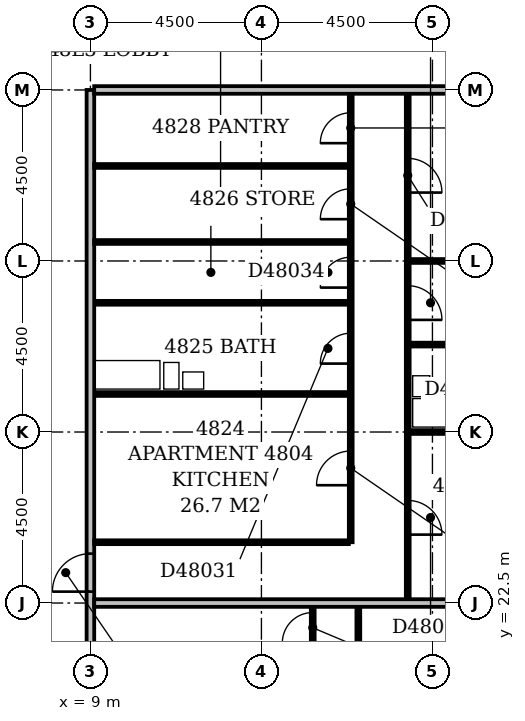
"""IFC4 building model, lengths in metres.
Left out: names, types, materials, properties, quantities, classifications, styles, units other than length and angle.
Written with IfcOpenShell. Run it as: python <this file> out.ifc"""

import sys

from ifc_helpers import new_model, si_unit, direction, frame, frame_2d, origin, place, context, subcontext, project, spatial, rectangle, extrude, element, fill, save


model = new_model("IFC4")
c1 = context("Model", 3, precision=1e-05, world=origin(), true_north=direction((0.0, 1.0)))
c2 = subcontext(c1, "Body", "Model", "MODEL_VIEW")
j1 = project(units=[si_unit("LENGTHUNIT", "METRE"), si_unit("PLANEANGLEUNIT", "RADIAN")], contexts=[c1])
p1 = place(None, origin())
s1 = spatial("IfcSite", under=j1, at=p1, CompositionType="ELEMENT")
p2 = place(p1, origin())
s2 = spatial("IfcBuilding", under=s1, at=p2, CompositionType="ELEMENT")
p3 = place(p2, frame((0.0, 0.0, 189.8)))
s3 = spatial("IfcBuildingStorey", under=s2, at=p3, CompositionType="ELEMENT", Elevation=189.8)
p4 = place(p3, frame((9.0, 5.0, 0.0), z_axis=(0.0, 0.0, 1.0), x_axis=(0.0, 1.0, 0.0)))
e1 = element("IfcWall", 1, at=p4, inside=s3, PredefinedType="PARTITIONING", context=c2, shape_type="SweptSolid", body=[
    extrude(rectangle(XDim=31.0, YDim=0.2, at=frame_2d((15.5, 0.0))), origin(), (0.0, 0.0, 1.0), 3.3),
])
p5 = place(p4, frame((17.8, 0.0, 0.0)))
e2 = element("IfcOpeningElement", 2, at=p5, cuts=e1, PredefinedType="OPENING", context=c2, shape_type="SweptSolid", body=[
    extrude(rectangle(XDim=1.0, YDim=2.1, at=frame_2d((0.5, 1.05))), frame((0.0, 0.112, 0.0), z_axis=(0.0, -1.0, 0.0), x_axis=(1.0, 0.0, 0.0)), (0.0, 0.0, 1.0), 0.224),
])
p6 = place(p4, frame((14.95, 0.0, 0.0)))
e3 = element("IfcOpeningElement", 3, at=p6, cuts=e1, PredefinedType="OPENING", context=c2, shape_type="SweptSolid", body=[
    extrude(rectangle(XDim=1.0, YDim=2.1, at=frame_2d((0.5, 1.05))), frame((0.0, 0.112, 0.0), z_axis=(0.0, -1.0, 0.0), x_axis=(1.0, 0.0, 0.0)), (0.0, 0.0, 1.0), 0.224),
])
p7 = place(p4, frame((9.3, 0.0, 0.0)))
e4 = element("IfcOpeningElement", 4, at=p7, cuts=e1, PredefinedType="OPENING", context=c2, shape_type="SweptSolid", body=[
    extrude(rectangle(XDim=1.0, YDim=2.1, at=frame_2d((0.5, 1.05))), frame((0.0, 0.112, 0.0), z_axis=(0.0, -1.0, 0.0), x_axis=(1.0, 0.0, 0.0)), (0.0, 0.0, 1.0), 0.224),
])
p8 = place(p4, frame((1.5, 0.0, 0.0)))
e5 = element("IfcOpeningElement", 5, at=p8, cuts=e1, PredefinedType="OPENING", context=c2, shape_type="SweptSolid", body=[
    extrude(rectangle(XDim=0.9, YDim=2.1, at=frame_2d((0.45, 1.05))), frame((0.0, 0.112, 0.0), z_axis=(0.0, -1.0, 0.0), x_axis=(1.0, 0.0, 0.0)), (0.0, 0.0, 1.0), 0.224),
])
p9 = place(p3, frame((16.05, 18.1, 0.0), z_axis=(0.0, 0.0, 1.0), x_axis=(0.0, 1.0, 0.0)))
e6 = element("IfcWall", 6, at=p9, inside=s3, PredefinedType="PARTITIONING", context=c2, shape_type="SweptSolid", body=[
    extrude(rectangle(XDim=4.3, YDim=0.1, at=frame_2d((2.15, 0.0))), origin(), (0.0, 0.0, 1.0), 3.3),
])
p10 = place(p9, frame((1.7, 0.0, 0.0)))
e7 = element("IfcOpeningElement", 7, at=p10, cuts=e6, PredefinedType="OPENING", context=c2, shape_type="SweptSolid", body=[
    extrude(rectangle(XDim=0.9, YDim=2.1, at=frame_2d((0.45, 1.05))), frame((0.0, 0.062, 0.0), z_axis=(0.0, -1.0, 0.0), x_axis=(1.0, 0.0, 0.0)), (0.0, 0.0, 1.0), 0.124),
])
p11 = place(p3, frame((14.85, 21.2, 0.0), z_axis=(0.0, 0.0, 1.0), x_axis=(0.0, 1.0, 0.0)))
e8 = element("IfcWall", 8, at=p11, inside=s3, PredefinedType="PARTITIONING", context=c2, shape_type="SweptSolid", body=[
    extrude(rectangle(XDim=1.2, YDim=0.1, at=frame_2d((0.6, 0.0))), origin(), (0.0, 0.0, 1.0), 3.3),
])
p12 = place(p11, frame((0.25, 0.0, 0.0)))
e9 = element("IfcOpeningElement", 9, at=p12, cuts=e8, PredefinedType="OPENING", context=c2, shape_type="SweptSolid", body=[
    extrude(rectangle(XDim=0.8, YDim=2.1, at=frame_2d((0.4, 1.05))), frame((0.0, 0.062, 0.0), z_axis=(0.0, -1.0, 0.0), x_axis=(1.0, 0.0, 0.0)), (0.0, 0.0, 1.0), 0.124),
])
p13 = place(p3, frame((9.1, 22.5, 0.0), z_axis=(0.0, 0.0, 1.0), x_axis=(1.0, 0.0, 0.0)))
e10 = element("IfcWall", 10, at=p13, inside=s3, PredefinedType="PARTITIONING", context=c2, shape_type="SweptSolid", body=[
    extrude(rectangle(XDim=12.95, YDim=0.2, at=frame_2d((6.475, 0.0))), origin(), (0.0, 0.0, 1.0), 3.3),
])
p14 = place(p3, frame((17.35, 22.6, 0.0), z_axis=(0.0, 0.0, 1.0), x_axis=(0.0, 1.0, 0.0)))
e11 = element("IfcWall", 11, at=p14, inside=s3, PredefinedType="PARTITIONING", context=c2, shape_type="SweptSolid", body=[
    extrude(rectangle(XDim=13.3, YDim=0.1, at=frame_2d((6.65, 0.0))), origin(), (0.0, 0.0, 1.0), 3.3),
])
p15 = place(p14, frame((1.7, 0.0, 0.0)))
e12 = element("IfcOpeningElement", 12, at=p15, cuts=e11, PredefinedType="OPENING", context=c2, shape_type="SweptSolid", body=[
    extrude(rectangle(XDim=0.9, YDim=2.1, at=frame_2d((0.45, 1.05))), frame((0.0, 0.062, 0.0), z_axis=(0.0, -1.0, 0.0), x_axis=(1.0, 0.0, 0.0)), (0.0, 0.0, 1.0), 0.124),
])
p16 = place(p14, frame((7.35, 0.0, 0.0)))
e13 = element("IfcOpeningElement", 13, at=p16, cuts=e11, PredefinedType="OPENING", context=c2, shape_type="SweptSolid", body=[
    extrude(rectangle(XDim=0.9, YDim=2.1, at=frame_2d((0.45, 1.05))), frame((0.0, 0.062, 0.0), z_axis=(0.0, -1.0, 0.0), x_axis=(1.0, 0.0, 0.0)), (0.0, 0.0, 1.0), 0.124),
])
p17 = place(p14, frame((10.7, 0.0, 0.0)))
e14 = element("IfcOpeningElement", 14, at=p17, cuts=e11, PredefinedType="OPENING", context=c2, shape_type="SweptSolid", body=[
    extrude(rectangle(XDim=0.9, YDim=2.1, at=frame_2d((0.45, 1.05))), frame((0.0, 0.062, 0.0), z_axis=(0.0, -1.0, 0.0), x_axis=(1.0, 0.0, 0.0)), (0.0, 0.0, 1.0), 0.124),
])
p18 = place(p3, frame((9.1, 24.1, 0.0), z_axis=(0.0, 0.0, 1.0), x_axis=(1.0, 0.0, 0.0)))
e15 = element("IfcWall", 15, at=p18, inside=s3, PredefinedType="PARTITIONING", context=c2, shape_type="SweptSolid", body=[
    extrude(rectangle(XDim=6.7, YDim=0.1, at=frame_2d((3.35, 0.0))), origin(), (0.0, 0.0, 1.0), 3.3),
])
p19 = place(p3, frame((15.85, 24.1, 0.0), z_axis=(0.0, 0.0, 1.0), x_axis=(0.0, 1.0, 0.0)))
e16 = element("IfcWall", 16, at=p19, inside=s3, PredefinedType="PARTITIONING", context=c2, shape_type="SweptSolid", body=[
    extrude(rectangle(XDim=11.8, YDim=0.1, at=frame_2d((5.9, 0.0))), origin(), (0.0, 0.0, 1.0), 3.3),
])
p20 = place(p19, frame((4.7, 0.0, 0.0)))
e17 = element("IfcOpeningElement", 17, at=p20, cuts=e16, PredefinedType="OPENING", context=c2, shape_type="SweptSolid", body=[
    extrude(rectangle(XDim=0.8, YDim=2.1, at=frame_2d((0.4, 1.05))), frame((0.0, 0.062, 0.0), z_axis=(0.0, -1.0, 0.0), x_axis=(1.0, 0.0, 0.0)), (0.0, 0.0, 1.0), 0.124),
])
p21 = place(p19, frame((1.5, 0.0, 0.0)))
e18 = element("IfcOpeningElement", 18, at=p21, cuts=e16, PredefinedType="OPENING", context=c2, shape_type="SweptSolid", body=[
    extrude(rectangle(XDim=0.9, YDim=2.1, at=frame_2d((0.45, 1.05))), frame((0.0, 0.062, 0.0), z_axis=(0.0, -1.0, 0.0), x_axis=(1.0, 0.0, 0.0)), (0.0, 0.0, 1.0), 0.124),
])
p22 = place(p19, frame((10.5, 0.0, 0.0)))
e19 = element("IfcOpeningElement", 19, at=p22, cuts=e16, PredefinedType="OPENING", context=c2, shape_type="SweptSolid", body=[
    extrude(rectangle(XDim=0.8, YDim=2.1, at=frame_2d((0.4, 1.05))), frame((0.0, 0.062, 0.0), z_axis=(0.0, -1.0, 0.0), x_axis=(1.0, 0.0, 0.0)), (0.0, 0.0, 1.0), 0.124),
])
p23 = place(p19, frame((6.7, 0.0, 0.0)))
e20 = element("IfcOpeningElement", 20, at=p23, cuts=e16, PredefinedType="OPENING", context=c2, shape_type="SweptSolid", body=[
    extrude(rectangle(XDim=0.8, YDim=2.1, at=frame_2d((0.4, 1.05))), frame((0.0, 0.062, 0.0), z_axis=(0.0, -1.0, 0.0), x_axis=(1.0, 0.0, 0.0)), (0.0, 0.0, 1.0), 0.124),
])
p24 = place(p19, frame((8.5, 0.0, 0.0)))
e21 = element("IfcOpeningElement", 21, at=p24, cuts=e16, PredefinedType="OPENING", context=c2, shape_type="SweptSolid", body=[
    extrude(rectangle(XDim=0.8, YDim=2.1, at=frame_2d((0.4, 1.05))), frame((0.0, 0.062, 0.0), z_axis=(0.0, -1.0, 0.0), x_axis=(1.0, 0.0, 0.0)), (0.0, 0.0, 1.0), 0.124),
])
p25 = place(p3, frame((17.4, 27.0, 0.0), z_axis=(0.0, 0.0, 1.0), x_axis=(1.0, 0.0, 0.0)))
e22 = element("IfcWall", 22, at=p25, inside=s3, PredefinedType="PARTITIONING", context=c2, shape_type="SweptSolid", body=[
    extrude(rectangle(XDim=4.65, YDim=0.1, at=frame_2d((2.325, 0.0))), origin(), (0.0, 0.0, 1.0), 2.7),
])
p26 = place(p3, frame((9.1, 28.0, 0.0), z_axis=(0.0, 0.0, 1.0), x_axis=(1.0, 0.0, 0.0)))
e23 = element("IfcWall", 23, at=p26, inside=s3, PredefinedType="PLUMBINGWALL", context=c2, shape_type="SweptSolid", body=[
    extrude(rectangle(XDim=6.7, YDim=0.1, at=frame_2d((3.35, 0.0))), origin(), (0.0, 0.0, 1.0), 3.3),
])
p27 = place(p3, frame((17.4, 29.3, 0.0), z_axis=(0.0, 0.0, 1.0), x_axis=(1.0, 0.0, 0.0)))
e24 = element("IfcWall", 24, at=p27, inside=s3, PredefinedType="PLUMBINGWALL", context=c2, shape_type="SweptSolid", body=[
    extrude(rectangle(XDim=2.8, YDim=0.1, at=frame_2d((1.4, 0.0))), origin(), (0.0, 0.0, 1.0), 3.3),
])
p28 = place(p27, frame((1.0, 0.0, 0.0)))
e25 = element("IfcOpeningElement", 25, at=p28, cuts=e24, PredefinedType="OPENING", context=c2, shape_type="SweptSolid", body=[
    extrude(rectangle(XDim=0.8, YDim=2.1, at=frame_2d((0.4, 1.05))), frame((0.0, 0.062, 0.0), z_axis=(0.0, -1.0, 0.0), x_axis=(1.0, 0.0, 0.0)), (0.0, 0.0, 1.0), 0.124),
])
p29 = place(p3, frame((9.1, 30.4, 0.0), z_axis=(0.0, 0.0, 1.0), x_axis=(1.0, 0.0, 0.0)))
e26 = element("IfcWall", 26, at=p29, inside=s3, PredefinedType="PLUMBINGWALL", context=c2, shape_type="SweptSolid", body=[
    extrude(rectangle(XDim=6.7, YDim=0.1, at=frame_2d((3.35, 0.0))), origin(), (0.0, 0.0, 1.0), 3.3),
])
p30 = place(p3, frame((17.4, 31.5, 0.0), z_axis=(0.0, 0.0, 1.0), x_axis=(1.0, 0.0, 0.0)))
e27 = element("IfcWall", 27, at=p30, inside=s3, PredefinedType="PARTITIONING", context=c2, shape_type="SweptSolid", body=[
    extrude(rectangle(XDim=4.65, YDim=0.1, at=frame_2d((2.325, 0.0))), origin(), (0.0, 0.0, 1.0), 3.3),
])
for number, where, z_axis, x_axis in (
    (28, (9.1, 32.0, 0.0), (0.0, 0.0, 1.0), (1.0, 0.0, 0.0)),
    (29, (9.1, 34.0, 0.0), (0.0, 0.0, 1.0), (1.0, 0.0, 0.0)),
):
    element("IfcWall", number, at=place(p3, frame(where, z_axis=z_axis, x_axis=x_axis)), inside=s3, PredefinedType="PARTITIONING", context=c2, shape_type="SweptSolid", body=[
        extrude(rectangle(XDim=6.7, YDim=0.1, at=frame_2d((3.35, 0.0))), origin(), (0.0, 0.0, 1.0), 3.3),
    ])
p31 = place(p3, frame((9.1, 36.0, 0.0), z_axis=(0.0, 0.0, 1.0), x_axis=(1.0, 0.0, 0.0)))
e30 = element("IfcWall", 30, at=p31, inside=s3, PredefinedType="PARTITIONING", context=c2, shape_type="SweptSolid", body=[
    extrude(rectangle(XDim=12.95, YDim=0.2, at=frame_2d((6.475, 0.0))), origin(), (0.0, 0.0, 1.0), 3.3),
])
p32 = place(p5, origin())
e31 = element("IfcDoor", 31, at=p32, inside=s3, OperationType="SINGLE_SWING_LEFT", PredefinedType="DOOR", context=c2, shape_type="SweptSolid", body=[
    extrude(rectangle(XDim=1.0, YDim=2.1, at=frame_2d((0.5, 1.05))), frame((0.0, 0.025, 0.0), z_axis=(0.0, -1.0, 0.0), x_axis=(1.0, 0.0, 0.0)), (0.0, 0.0, 1.0), 0.05),
])
fill(e2, e31)
p33 = place(p12, origin())
e32 = element("IfcDoor", 32, at=p33, inside=s3, OperationType="SINGLE_SWING_LEFT", PredefinedType="DOOR", context=c2, shape_type="SweptSolid", body=[
    extrude(rectangle(XDim=0.8, YDim=2.1, at=frame_2d((0.4, 1.05))), frame((0.0, 0.025, 0.0), z_axis=(0.0, -1.0, 0.0), x_axis=(1.0, 0.0, 0.0)), (0.0, 0.0, 1.0), 0.05),
])
fill(e9, e32)
p34 = place(p15, frame((0.9, 0.0, 0.0), z_axis=(0.0, 0.0, 1.0), x_axis=(-1.0, 0.0, 0.0)))
e33 = element("IfcDoor", 33, at=p34, inside=s3, OperationType="SINGLE_SWING_RIGHT", PredefinedType="DOOR", context=c2, shape_type="SweptSolid", body=[
    extrude(rectangle(XDim=0.9, YDim=2.1, at=frame_2d((0.45, 1.05))), frame((0.0, 0.025, 0.0), z_axis=(0.0, -1.0, 0.0), x_axis=(1.0, 0.0, 0.0)), (0.0, 0.0, 1.0), 0.05),
])
fill(e12, e33)
p35 = place(p16, frame((0.9, 0.0, 0.0), z_axis=(0.0, 0.0, 1.0), x_axis=(-1.0, 0.0, 0.0)))
e34 = element("IfcDoor", 34, at=p35, inside=s3, OperationType="SINGLE_SWING_RIGHT", PredefinedType="DOOR", context=c2, shape_type="SweptSolid", body=[
    extrude(rectangle(XDim=0.9, YDim=2.1, at=frame_2d((0.45, 1.05))), frame((0.0, 0.025, 0.0), z_axis=(0.0, -1.0, 0.0), x_axis=(1.0, 0.0, 0.0)), (0.0, 0.0, 1.0), 0.05),
])
fill(e13, e34)
p36 = place(p17, frame((0.9, 0.0, 0.0), z_axis=(0.0, 0.0, 1.0), x_axis=(-1.0, 0.0, 0.0)))
e35 = element("IfcDoor", 35, at=p36, inside=s3, OperationType="SINGLE_SWING_RIGHT", PredefinedType="DOOR", context=c2, shape_type="SweptSolid", body=[
    extrude(rectangle(XDim=0.9, YDim=2.1, at=frame_2d((0.45, 1.05))), frame((0.0, 0.025, 0.0), z_axis=(0.0, -1.0, 0.0), x_axis=(1.0, 0.0, 0.0)), (0.0, 0.0, 1.0), 0.05),
])
fill(e14, e35)
p37 = place(p20, origin())
e36 = element("IfcDoor", 36, at=p37, inside=s3, OperationType="SINGLE_SWING_LEFT", PredefinedType="DOOR", context=c2, shape_type="SweptSolid", body=[
    extrude(rectangle(XDim=0.8, YDim=2.1, at=frame_2d((0.4, 1.05))), frame((0.0, 0.025, 0.0), z_axis=(0.0, -1.0, 0.0), x_axis=(1.0, 0.0, 0.0)), (0.0, 0.0, 1.0), 0.05),
])
fill(e17, e36)
p38 = place(p21, origin())
e37 = element("IfcDoor", 37, at=p38, inside=s3, OperationType="SINGLE_SWING_LEFT", PredefinedType="DOOR", context=c2, shape_type="SweptSolid", body=[
    extrude(rectangle(XDim=0.9, YDim=2.1, at=frame_2d((0.45, 1.05))), frame((0.0, 0.025, 0.0), z_axis=(0.0, -1.0, 0.0), x_axis=(1.0, 0.0, 0.0)), (0.0, 0.0, 1.0), 0.05),
])
fill(e18, e37)
p39 = place(p22, origin())
e38 = element("IfcDoor", 38, at=p39, inside=s3, OperationType="SINGLE_SWING_LEFT", PredefinedType="DOOR", context=c2, shape_type="SweptSolid", body=[
    extrude(rectangle(XDim=0.8, YDim=2.1, at=frame_2d((0.4, 1.05))), frame((0.0, 0.025, 0.0), z_axis=(0.0, -1.0, 0.0), x_axis=(1.0, 0.0, 0.0)), (0.0, 0.0, 1.0), 0.05),
])
fill(e19, e38)
p40 = place(p23, origin())
e39 = element("IfcDoor", 39, at=p40, inside=s3, OperationType="SINGLE_SWING_LEFT", PredefinedType="DOOR", context=c2, shape_type="SweptSolid", body=[
    extrude(rectangle(XDim=0.8, YDim=2.1, at=frame_2d((0.4, 1.05))), frame((0.0, 0.025, 0.0), z_axis=(0.0, -1.0, 0.0), x_axis=(1.0, 0.0, 0.0)), (0.0, 0.0, 1.0), 0.05),
])
fill(e20, e39)
p41 = place(p24, origin())
e40 = element("IfcDoor", 40, at=p41, inside=s3, OperationType="SINGLE_SWING_LEFT", PredefinedType="DOOR", context=c2, shape_type="SweptSolid", body=[
    extrude(rectangle(XDim=0.8, YDim=2.1, at=frame_2d((0.4, 1.05))), frame((0.0, 0.025, 0.0), z_axis=(0.0, -1.0, 0.0), x_axis=(1.0, 0.0, 0.0)), (0.0, 0.0, 1.0), 0.05),
])
fill(e21, e40)
save(model, sys.argv[1])
